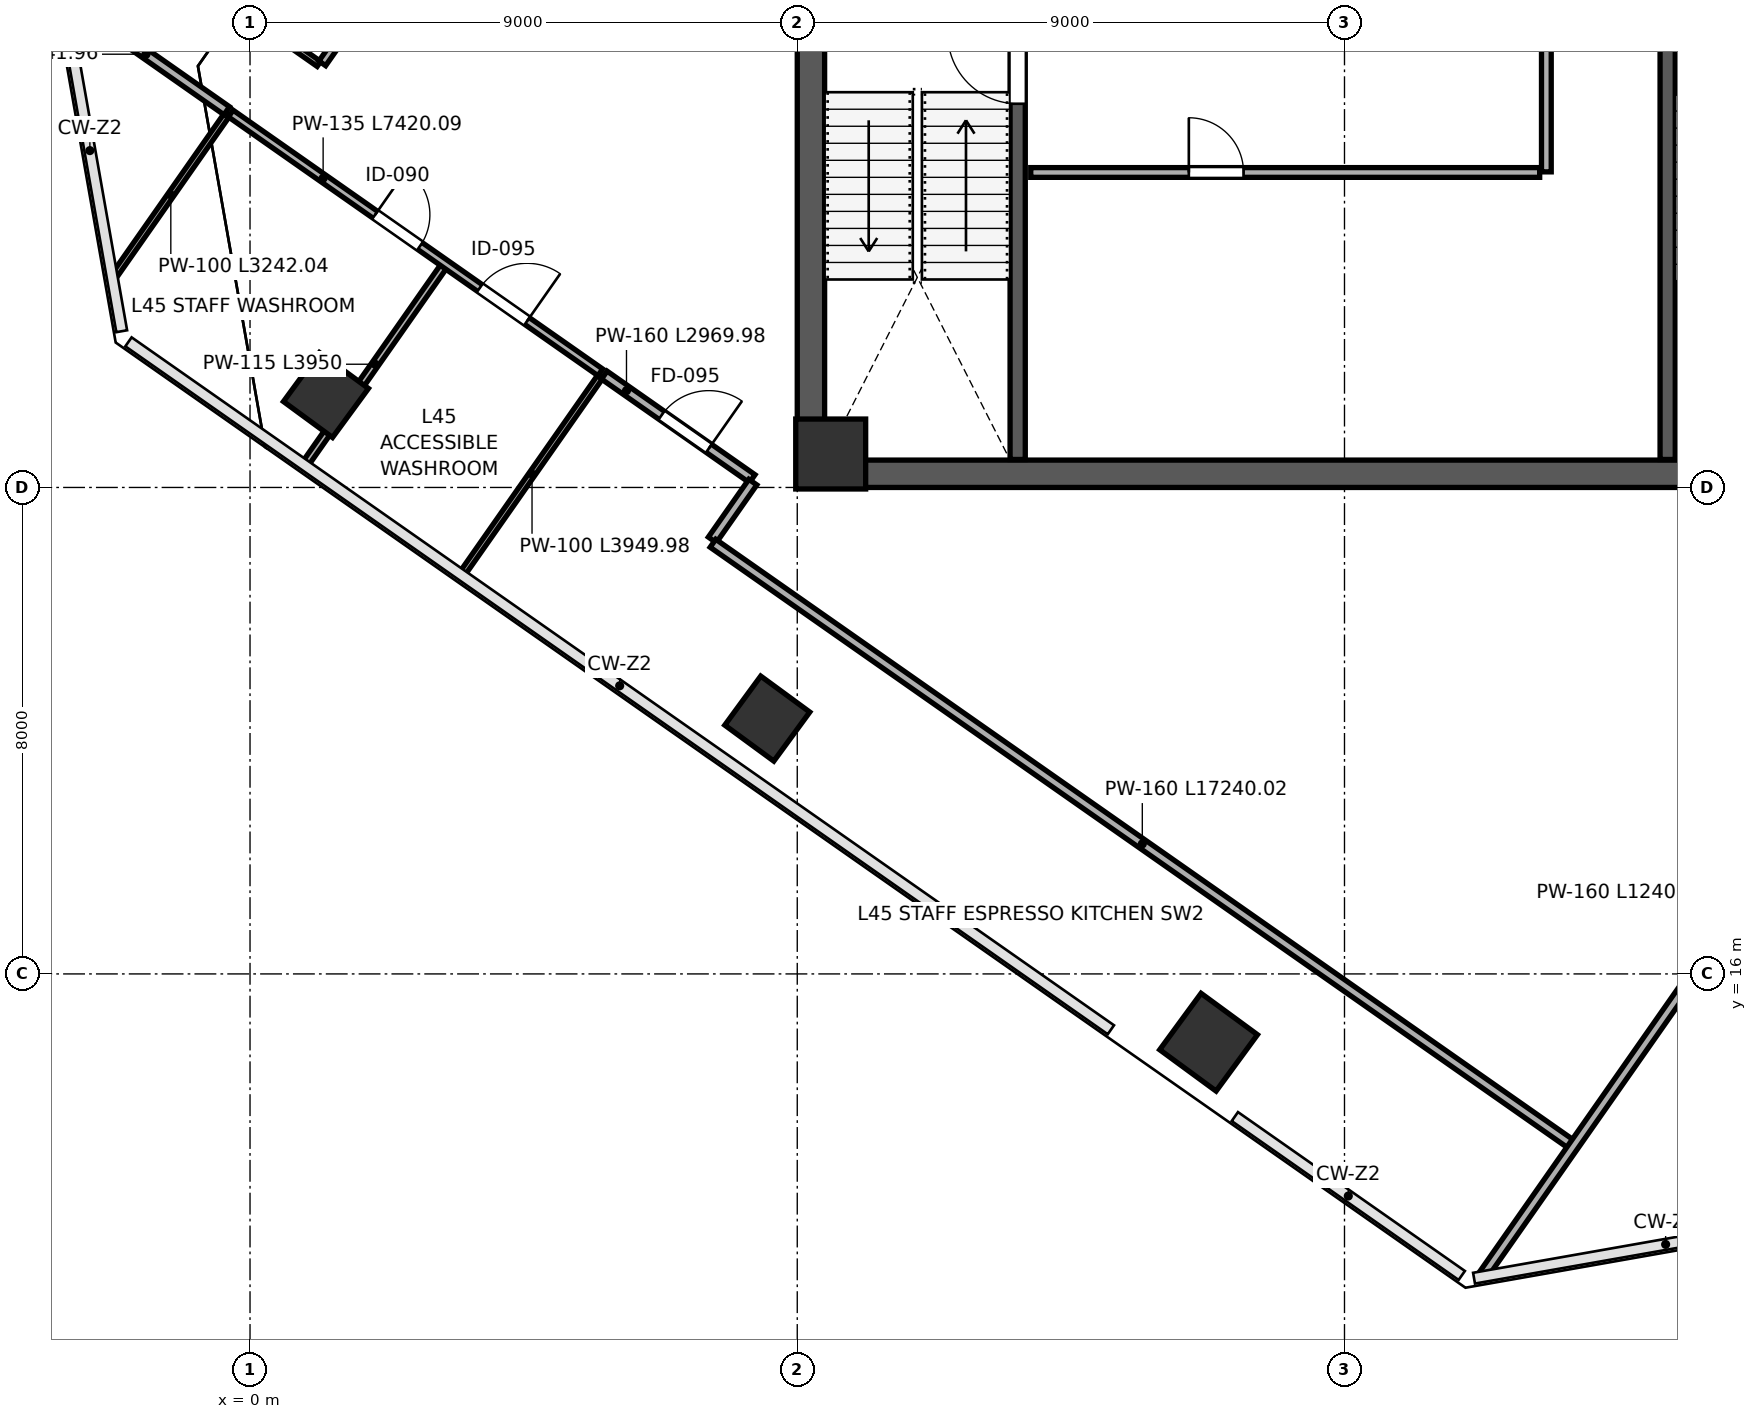
"""IFC4 building model, lengths in metres.
Left out: names, types, materials, properties, quantities, classifications, styles, units other than length and angle.
Written with IfcOpenShell. Run it as: python <this file> out.ifc"""

import sys

from ifc_helpers import new_model, si_unit, direction, frame, frame_2d, origin, origin_2d, place, context, subcontext, project, spatial, rectangle, extrude, clip, halfspace, source, transform, mapped, element, fill, save


model = new_model("IFC4")
c1 = context("Model", 3, precision=1e-05, world=origin(), true_north=direction((0.0, 1.0)))
c2 = subcontext(c1, "Body", "Model", "MODEL_VIEW")
j1 = project(units=[si_unit("LENGTHUNIT", "METRE"), si_unit("PLANEANGLEUNIT", "RADIAN")], contexts=[c1])
p1 = place(None, origin())
s1 = spatial("IfcSite", under=j1, at=p1, CompositionType="ELEMENT")
p2 = place(p1, origin())
s2 = spatial("IfcBuilding", under=s1, at=p2, CompositionType="ELEMENT")
p3 = place(p2, frame((0.0, 0.0, 200.2)))
s3 = spatial("IfcBuildingStorey", under=s2, at=p3, CompositionType="ELEMENT", Elevation=200.2)
m1 = source(origin(), c2, "Body", "SweptSolid", [
    extrude(rectangle(XDim=1.15, YDim=1.15, at=origin_2d()), origin(), (0.0, 0.0, 1.0), 4.198),
])
p4 = place(p3, frame((9.55, 24.55, 0.001), z_axis=(0.0, 0.0, 1.0), x_axis=(1.0, 0.0, 0.0)))
e1 = element("IfcColumn", 1, at=p4, inside=s3, PredefinedType="COLUMN", context=c2, shape_type="MappedRepresentation", body=[
    mapped(m1, transform((0.0, 0.0, 0.0), scale=1.0)),
])
p5 = place(p3, frame((1.249, 25.521, 0.0), z_axis=(-0.032297921556, 0.104924911531, 0.993955535828), x_axis=(0.943665188787, -0.324471766537, 0.064915977944)))
e2 = element("IfcColumn", 2, at=p5, inside=s3, PredefinedType="COLUMN", context=c2, shape_type="Clipping", body=[
    clip(clip(extrude(rectangle(XDim=1.0, YDim=1.0, at=origin_2d()), origin(), (0.0, 0.0, 1.0), 4.226), halfspace(frame((0.0, 0.0, 0.078), z_axis=(0.0, 0.0, -1.0), x_axis=(1.0, 0.0, 0.0)), False)), halfspace(frame((0.0, 0.0, 4.148), z_axis=(0.0, 0.0, 1.0), x_axis=(1.0, 0.0, 0.0)), False)),
])
p6 = place(p3, frame((8.507, 20.199, 0.0), z_axis=(-0.060262794758, 0.0679041866, 0.995870180802), x_axis=(0.994042239794, 0.094857947817, 0.053684217801)))
e3 = element("IfcColumn", 3, at=p6, inside=s3, PredefinedType="COLUMN", context=c2, shape_type="Clipping", body=[
    clip(clip(extrude(rectangle(XDim=1.0, YDim=1.0, at=origin_2d()), origin(), (0.0, 0.0, 1.0), 4.217), halfspace(frame((0.0, 0.0, 0.064), z_axis=(0.0, 0.0, -1.0), x_axis=(1.0, 0.0, 0.0)), False)), halfspace(frame((0.0, 0.0, 4.153), z_axis=(0.0, 0.0, 1.0), x_axis=(1.0, 0.0, 0.0)), False)),
])
p7 = place(p3, frame((15.765, 14.877, 0.0), z_axis=(-0.088259663974, 0.030615975241, 0.995626884819), x_axis=(0.820504029845, 0.568965490713, 0.055239545482)))
e4 = element("IfcColumn", 4, at=p7, inside=s3, PredefinedType="COLUMN", context=c2, shape_type="Clipping", body=[
    clip(clip(extrude(rectangle(XDim=1.15, YDim=1.15, at=origin_2d()), origin(), (0.0, 0.0, 1.0), 4.219), halfspace(frame((0.0, 0.0, 0.076), z_axis=(0.0, 0.0, -1.0), x_axis=(1.0, 0.0, 0.0)), False)), halfspace(frame((0.0, 0.0, 4.142), z_axis=(0.0, 0.0, 1.0), x_axis=(1.0, 0.0, 0.0)), False)),
])
p8 = place(p3, frame((9.225, 24.45, 0.0), z_axis=(0.0, 0.0, 1.0), x_axis=(0.0, 1.0, 0.0)))
e5 = element("IfcWall", 5, at=p8, inside=s3, PredefinedType="SHEAR", context=c2, shape_type="SweptSolid", body=[
    extrude(rectangle(XDim=15.1, YDim=0.45, at=frame_2d((7.55, 0.0))), origin(), (0.0, 0.0, 1.0), 3.96),
])
p9 = place(p3, frame((9.0, 24.225, 0.0), z_axis=(0.0, 0.0, 1.0), x_axis=(1.0, 0.0, 0.0)))
e6 = element("IfcWall", 6, at=p9, inside=s3, PredefinedType="SHEAR", context=c2, shape_type="SweptSolid", body=[
    extrude(rectangle(XDim=18.0, YDim=0.45, at=frame_2d((9.0, 0.0))), origin(), (0.0, 0.0, 1.0), 3.96),
])
p10 = place(p3, frame((12.625, 24.46, 0.0), z_axis=(0.0, 0.0, 1.0), x_axis=(0.0, 1.0, 0.0)))
e7 = element("IfcWall", 7, at=p10, inside=s3, PredefinedType="SHEAR", context=c2, shape_type="SweptSolid", body=[
    extrude(rectangle(XDim=7.49, YDim=0.25, at=frame_2d((3.745, 0.0))), origin(), (0.0, 0.0, 1.0), 3.96),
])
p11 = place(p10, frame((5.85, 0.0, 0.0)))
e8 = element("IfcOpeningElement", 8, at=p11, cuts=e7, PredefinedType="OPENING", context=c2, shape_type="SweptSolid", body=[
    extrude(rectangle(XDim=1.15, YDim=2.2, at=frame_2d((0.575, 1.1))), frame((0.0, 0.135, 0.0), z_axis=(0.0, -1.0, 0.0), x_axis=(1.0, 0.0, 0.0)), (0.0, 0.0, 1.0), 0.27),
])
p12 = place(p3, frame((23.315, 24.46, 0.0), z_axis=(0.0, 0.0, 1.0), x_axis=(0.0, 1.0, 0.0)))
e9 = element("IfcWall", 9, at=p12, inside=s3, PredefinedType="SHEAR", context=c2, shape_type="SweptSolid", body=[
    extrude(rectangle(XDim=7.49, YDim=0.25, at=frame_2d((3.745, 0.0))), origin(), (0.0, 0.0, 1.0), 3.96),
])
p13 = place(p3, frame((12.84, 29.18, 0.0), z_axis=(0.0, 0.0, 1.0), x_axis=(1.0, 0.0, 0.0)))
e10 = element("IfcWall", 10, at=p13, inside=s3, PredefinedType="PARTITIONING", context=c2, shape_type="SweptSolid", body=[
    extrude(rectangle(XDim=8.37, YDim=0.16, at=frame_2d((4.185, 0.0))), origin(), (0.0, 0.0, 1.0), 3.96),
])
p14 = place(p13, frame((2.6, 0.0, 0.0)))
e11 = element("IfcOpeningElement", 11, at=p14, cuts=e10, PredefinedType="OPENING", context=c2, shape_type="SweptSolid", body=[
    extrude(rectangle(XDim=0.9, YDim=2.15, at=frame_2d((0.45, 1.075))), frame((0.0, 0.09, 0.0), z_axis=(0.0, -1.0, 0.0), x_axis=(1.0, 0.0, 0.0)), (0.0, 0.0, 1.0), 0.18),
])
p15 = place(p3, frame((21.32, 29.19, 0.0), z_axis=(0.0, 0.0, 1.0), x_axis=(0.0, 1.0, 0.0)))
e12 = element("IfcWall", 12, at=p15, inside=s3, PredefinedType="PARTITIONING", context=c2, shape_type="SweptSolid", body=[
    extrude(rectangle(XDim=2.92, YDim=0.16, at=frame_2d((1.46, 0.0))), origin(), (0.0, 0.0, 1.0), 3.96),
])
p16 = place(p3, frame((-2.232, 27.484, 0.0), z_axis=(0.0, 0.0, 1.0), x_axis=(0.573583631645, 0.819147006043, 0.0)))
e13 = element("IfcWall", 13, at=p16, inside=s3, PredefinedType="PARTITIONING", context=c2, shape_type="SweptSolid", body=[
    extrude(rectangle(XDim=3.242, YDim=0.1, at=frame_2d((1.621, 0.0))), origin(), (0.0, 0.0, 1.0), 3.96),
])
p17 = place(p3, frame((-3.038, 32.055, 0.0), z_axis=(0.0, 0.0, 1.0), x_axis=(0.819122229171, -0.573619014397, 0.0)))
e14 = element("IfcWall", 14, at=p17, inside=s3, PredefinedType="PARTITIONING", context=c2, shape_type="SweptSolid", body=[
    extrude(rectangle(XDim=3.242, YDim=0.16, at=frame_2d((1.621, 0.0))), origin(), (0.0, 0.0, 1.0), 3.96),
])
p18 = place(p3, frame((0.925, 24.409, 0.0), z_axis=(0.0, 0.0, 1.0), x_axis=(0.573582636552, 0.819147702826, 0.0)))
e15 = element("IfcWall", 15, at=p18, inside=s3, PredefinedType="PARTITIONING", context=c2, shape_type="SweptSolid", body=[
    extrude(rectangle(XDim=3.95, YDim=0.115, at=frame_2d((1.975, 0.0))), origin(), (0.0, 0.0, 1.0), 3.195),
])
p19 = place(p3, frame((3.505, 22.602, 0.0), z_axis=(0.0, 0.0, 1.0), x_axis=(0.573624108016, 0.819118662163, 0.0)))
e16 = element("IfcWall", 16, at=p19, inside=s3, PredefinedType="PARTITIONING", context=c2, shape_type="SweptSolid", body=[
    extrude(rectangle(XDim=3.95, YDim=0.1, at=frame_2d((1.975, 0.0))), origin(), (0.0, 0.0, 1.0), 3.195),
])
p20 = place(p3, frame((-0.317, 30.149, 0.0), z_axis=(0.0, 0.0, 1.0), x_axis=(0.819142256539, -0.573590414454, 0.0)))
e17 = element("IfcWall", 17, at=p20, inside=s3, PredefinedType="PARTITIONING", context=c2, shape_type="SweptSolid", body=[
    extrude(rectangle(XDim=7.42, YDim=0.135, at=frame_2d((3.71, 0.0))), origin(), (0.0, 0.0, 1.0), 3.96),
])
p21 = place(p20, frame((2.9, 0.0, 0.0)))
e18 = element("IfcOpeningElement", 18, at=p21, cuts=e17, PredefinedType="OPENING", context=c2, shape_type="SweptSolid", body=[
    extrude(rectangle(XDim=0.9, YDim=2.15, at=frame_2d((0.45, 1.075))), frame((0.0, 0.078, 0.0), z_axis=(0.0, -1.0, 0.0), x_axis=(1.0, 0.0, 0.0)), (0.0, 0.0, 1.0), 0.155),
])
p22 = place(p20, frame((5.0, 0.0, 0.0)))
e19 = element("IfcOpeningElement", 19, at=p22, cuts=e17, PredefinedType="OPENING", context=c2, shape_type="SweptSolid", body=[
    extrude(rectangle(XDim=0.95, YDim=2.15, at=frame_2d((0.475, 1.075))), frame((0.0, 0.078, 0.0), z_axis=(0.0, -1.0, 0.0), x_axis=(1.0, 0.0, 0.0)), (0.0, 0.0, 1.0), 0.155),
])
p23 = place(p3, frame((5.826, 25.847, 0.0), z_axis=(0.0, 0.0, 1.0), x_axis=(0.819135363828, -0.573600257781, 0.0)))
e20 = element("IfcWall", 20, at=p23, inside=s3, PredefinedType="PARTITIONING", context=c2, shape_type="SweptSolid", body=[
    extrude(rectangle(XDim=2.97, YDim=0.16, at=frame_2d((1.485, 0.0))), origin(), (0.0, 0.0, 1.0), 3.96),
])
p24 = place(p23, frame((1.15, 0.0, 0.0)))
e21 = element("IfcOpeningElement", 21, at=p24, cuts=e20, PredefinedType="OPENING", context=c2, shape_type="SweptSolid", body=[
    extrude(rectangle(XDim=0.95, YDim=2.15, at=frame_2d((0.475, 1.075))), frame((0.0, 0.09, 0.0), z_axis=(0.0, -1.0, 0.0), x_axis=(1.0, 0.0, 0.0)), (0.0, 0.0, 1.0), 0.18),
])
p25 = place(p3, frame((8.269, 24.088, 0.0), z_axis=(0.0, 0.0, 1.0), x_axis=(-0.573787211882, -0.819004417253, 0.0)))
e22 = element("IfcWall", 22, at=p25, inside=s3, PredefinedType="PARTITIONING", context=c2, shape_type="SweptSolid", body=[
    extrude(rectangle(XDim=1.16, YDim=0.16, at=frame_2d((0.58, 0.0))), origin(), (0.0, 0.0, 1.0), 3.96),
])
p26 = place(p3, frame((7.614, 23.082, 0.0), z_axis=(0.0, 0.0, 1.0), x_axis=(0.819144092075, -0.573587793123, 0.0)))
e23 = element("IfcWall", 23, at=p26, inside=s3, PredefinedType="PARTITIONING", context=c2, shape_type="SweptSolid", body=[
    extrude(rectangle(XDim=17.24, YDim=0.16, at=frame_2d((8.62, 0.0))), origin(), (0.0, 0.0, 1.0), 3.96),
])
p27 = place(p3, frame((-2.496, 33.506, 0.0), z_axis=(0.0, 0.0, 1.0), x_axis=(0.819130930641, -0.573606588584, 0.0)))
e24 = element("IfcWall", 24, at=p27, inside=s3, PredefinedType="PARTITIONING", context=c2, shape_type="SweptSolid", body=[
    extrude(rectangle(XDim=4.43, YDim=0.1, at=frame_2d((2.215, 0.0))), origin(), (0.0, 0.0, 1.0), 3.96),
])
p28 = place(p3, frame((1.189, 30.975, 0.0), z_axis=(0.0, 0.0, 1.0), x_axis=(0.573571020786, 0.819155836282, 0.0)))
e25 = element("IfcWall", 25, at=p28, inside=s3, PredefinedType="PARTITIONING", context=c2, shape_type="SweptSolid", body=[
    extrude(rectangle(XDim=23.67, YDim=0.135, at=frame_2d((11.835, 0.0))), origin(), (0.0, 0.0, 1.0), 3.96),
])
p29 = place(p28, frame((2.2, 0.0, 0.0)))
e26 = element("IfcOpeningElement", 26, at=p29, cuts=e25, PredefinedType="OPENING", context=c2, shape_type="SweptSolid", body=[
    extrude(rectangle(XDim=0.95, YDim=2.15, at=frame_2d((0.475, 1.075))), frame((0.0, 0.078, 0.0), z_axis=(0.0, -1.0, 0.0), x_axis=(1.0, 0.0, 0.0)), (0.0, 0.0, 1.0), 0.155),
])
p30 = place(p3, frame((20.293, 11.064, 0.0), z_axis=(0.0, 0.0, 1.0), x_axis=(0.573585209026, 0.819145901526, 0.0)))
e27 = element("IfcWall", 27, at=p30, inside=s3, PredefinedType="PARTITIONING", context=c2, shape_type="SweptSolid", body=[
    extrude(rectangle(XDim=12.402, YDim=0.16, at=frame_2d((6.201, 0.0))), origin(), (0.0, 0.0, 1.0), 3.96),
])
m2 = source(origin(), c2, "Body", "SweptSolid", [
    extrude(rectangle(XDim=1.15, YDim=2.2, at=frame_2d((0.575, 1.1))), frame((0.0, 0.025, 0.0), z_axis=(0.0, -1.0, 0.0), x_axis=(1.0, 0.0, 0.0)), (0.0, 0.0, 1.0), 0.05),
])
p31 = place(p11, origin())
e28 = element("IfcDoor", 28, at=p31, inside=s3, OperationType="SINGLE_SWING_RIGHT", PredefinedType="DOOR", context=c2, shape_type="MappedRepresentation", body=[
    mapped(m2, transform((0.0, 0.0, 0.0), scale=1.0)),
])
fill(e8, e28)
m3 = source(origin(), c2, "Body", "SweptSolid", [
    extrude(rectangle(XDim=0.9, YDim=2.15, at=frame_2d((0.45, 1.075))), frame((0.0, 0.025, 0.0), z_axis=(0.0, -1.0, 0.0), x_axis=(1.0, 0.0, 0.0)), (0.0, 0.0, 1.0), 0.05),
])
p32 = place(p14, origin())
e29 = element("IfcDoor", 29, at=p32, inside=s3, OperationType="SINGLE_SWING_LEFT", PredefinedType="DOOR", context=c2, shape_type="MappedRepresentation", body=[
    mapped(m3, transform((0.0, 0.0, 0.0), scale=1.0)),
])
fill(e11, e29)
m4 = source(origin(), c2, "Body", "SweptSolid", [
    extrude(rectangle(XDim=0.9, YDim=2.15, at=frame_2d((0.45, 1.075))), frame((0.0, 0.025, 0.0), z_axis=(0.0, -1.0, 0.0), x_axis=(1.0, 0.0, 0.0)), (0.0, 0.0, 1.0), 0.05),
])
p33 = place(p21, origin())
e30 = element("IfcDoor", 30, at=p33, inside=s3, OperationType="SINGLE_SWING_LEFT", PredefinedType="DOOR", context=c2, shape_type="MappedRepresentation", body=[
    mapped(m4, transform((0.0, 0.0, 0.0), scale=1.0)),
])
fill(e18, e30)
m5 = source(origin(), c2, "Body", "SweptSolid", [
    extrude(rectangle(XDim=0.95, YDim=2.15, at=frame_2d((0.475, 1.075))), frame((0.0, 0.025, 0.0), z_axis=(0.0, -1.0, 0.0), x_axis=(1.0, 0.0, 0.0)), (0.0, 0.0, 1.0), 0.05),
])
p34 = place(p22, origin())
e31 = element("IfcDoor", 31, at=p34, inside=s3, OperationType="SINGLE_SWING_RIGHT", PredefinedType="DOOR", context=c2, shape_type="MappedRepresentation", body=[
    mapped(m5, transform((0.0, 0.0, 0.0), scale=1.0)),
])
fill(e19, e31)
m6 = source(origin(), c2, "Body", "SweptSolid", [
    extrude(rectangle(XDim=0.95, YDim=2.15, at=frame_2d((0.475, 1.075))), frame((0.0, 0.025, 0.0), z_axis=(0.0, -1.0, 0.0), x_axis=(1.0, 0.0, 0.0)), (0.0, 0.0, 1.0), 0.05),
])
p35 = place(p24, origin())
e32 = element("IfcDoor", 32, at=p35, inside=s3, OperationType="SINGLE_SWING_RIGHT", PredefinedType="DOOR", context=c2, shape_type="MappedRepresentation", body=[
    mapped(m6, transform((0.0, 0.0, 0.0), scale=1.0)),
])
fill(e21, e32)
save(model, sys.argv[1])
